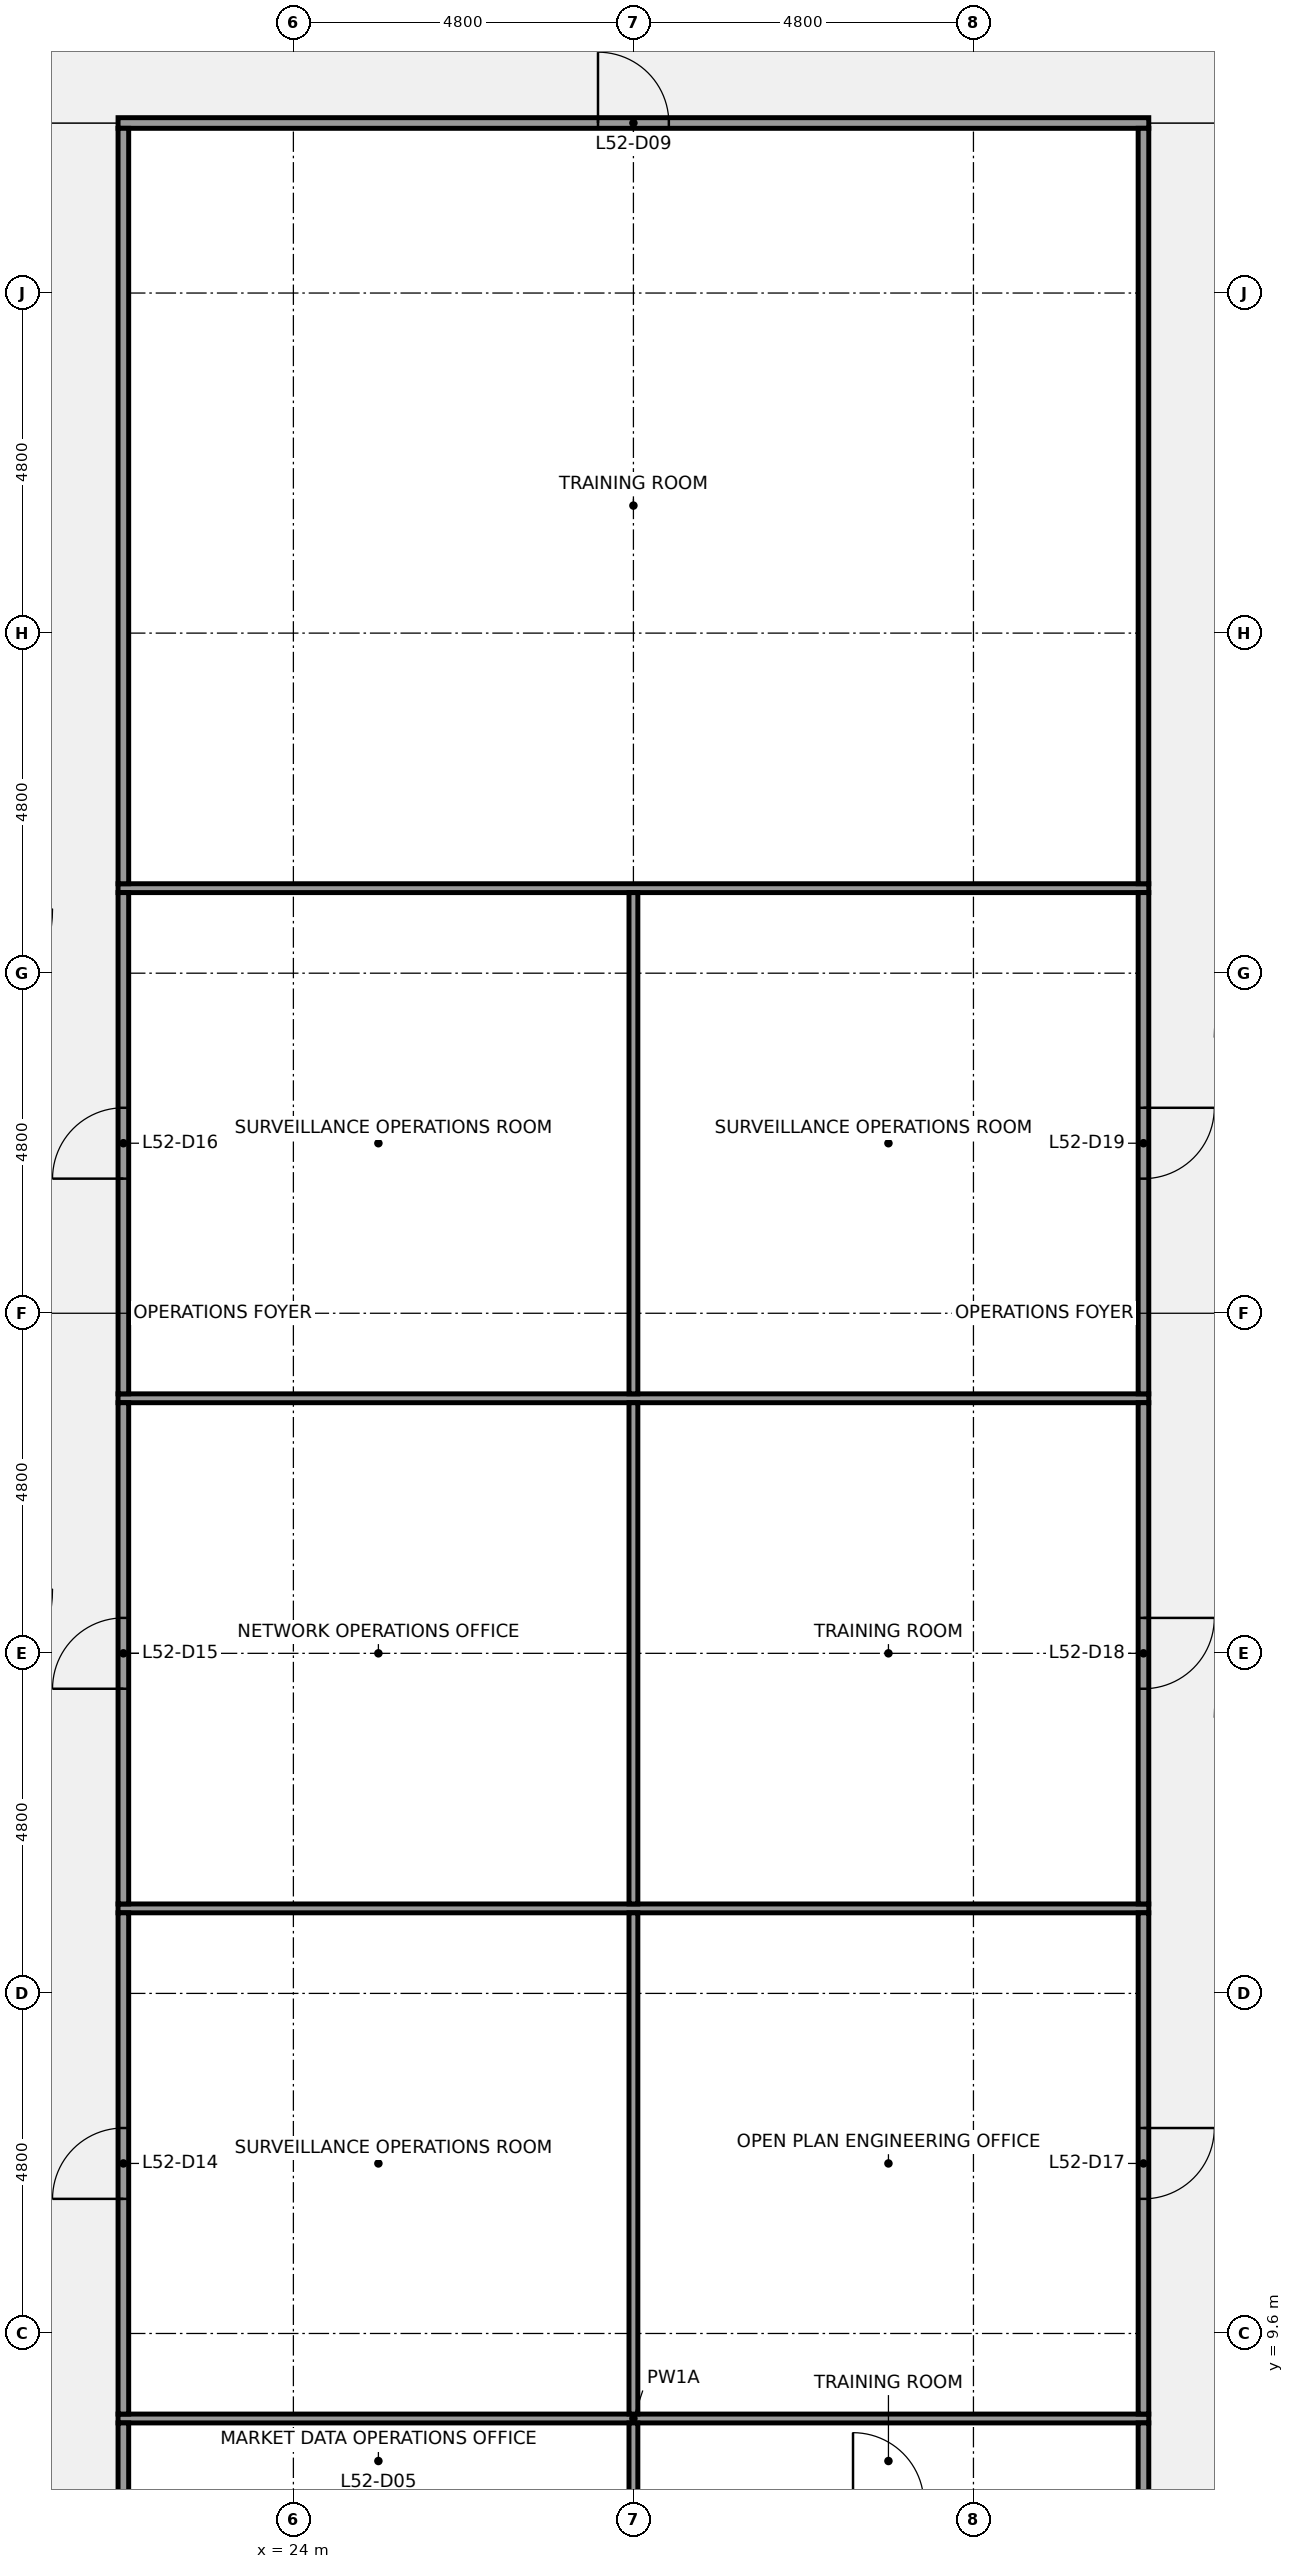
"""IFC4 building model, lengths in metres.
Left out: names, types, materials, properties, quantities, classifications, styles, units other than length and angle.
Written with IfcOpenShell. Run it as: python <this file> out.ifc"""

import sys

from ifc_helpers import new_model, si_unit, direction, frame, frame_2d, origin, place, context, subcontext, project, spatial, rectangle, extrude, element, fill, save


model = new_model("IFC4")
c1 = context("Model", 3, precision=1e-05, world=origin(), true_north=direction((0.0, 1.0)))
c2 = subcontext(c1, "Body", "Model", "MODEL_VIEW")
j1 = project(units=[si_unit("LENGTHUNIT", "METRE"), si_unit("PLANEANGLEUNIT", "RADIAN")], contexts=[c1])
p1 = place(None, origin())
s1 = spatial("IfcSite", under=j1, at=p1, CompositionType="ELEMENT")
p2 = place(p1, origin())
s2 = spatial("IfcBuilding", under=s1, at=p2, CompositionType="ELEMENT")
p3 = place(p2, frame((0.0, 0.0, 237.2)))
s3 = spatial("IfcBuildingStorey", under=s2, at=p3, CompositionType="ELEMENT", Elevation=237.2)
for number, where, z_axis, x_axis in (
    (1, (21.525, 8.4, 0.0), (0.0, 0.0, 1.0), (1.0, 0.0, 0.0)),
    (2, (21.525, 15.6, 0.0), (0.0, 0.0, 1.0), (1.0, 0.0, 0.0)),
    (3, (21.525, 22.8, 0.0), (0.0, 0.0, 1.0), (1.0, 0.0, 0.0)),
    (4, (21.525, 30.0, 0.0), (0.0, 0.0, 1.0), (1.0, 0.0, 0.0)),
):
    element("IfcWall", number, at=place(p3, frame(where, z_axis=z_axis, x_axis=x_axis)), inside=s3, PredefinedType="PARTITIONING", context=c2, shape_type="SweptSolid", body=[
        extrude(rectangle(XDim=14.55, YDim=0.125, at=frame_2d((7.275, 0.0))), origin(), (0.0, 0.0, 1.0), 2.87),
    ])
p4 = place(p3, frame((21.525, 40.8, 0.0), z_axis=(0.0, 0.0, 1.0), x_axis=(1.0, 0.0, 0.0)))
e5 = element("IfcWall", 5, at=p4, inside=s3, PredefinedType="PARTITIONING", context=c2, shape_type="SweptSolid", body=[
    extrude(rectangle(XDim=14.55, YDim=0.15, at=frame_2d((7.275, 0.0))), origin(), (0.0, 0.0, 1.0), 2.87),
])
p5 = place(p4, frame((6.775, 0.0, 0.0)))
e6 = element("IfcOpeningElement", 6, at=p5, cuts=e5, PredefinedType="OPENING", context=c2, shape_type="SweptSolid", body=[
    extrude(rectangle(XDim=1.0, YDim=2.1, at=frame_2d((0.5, 1.05))), frame((0.0, 0.085, 0.0), z_axis=(0.0, -1.0, 0.0), x_axis=(1.0, 0.0, 0.0)), (0.0, 0.0, 1.0), 0.17),
])
p6 = place(p3, frame((21.6, 7.275, 0.0), z_axis=(0.0, 0.0, 1.0), x_axis=(0.0, 1.0, 0.0)))
e7 = element("IfcWall", 7, at=p6, inside=s3, PredefinedType="PARTITIONING", context=c2, shape_type="SweptSolid", body=[
    extrude(rectangle(XDim=1.062, YDim=0.15, at=frame_2d((0.531, 0.0))), origin(), (0.0, 0.0, 1.0), 2.87),
])
p7 = place(p3, frame((21.6, 8.462, 0.0), z_axis=(0.0, 0.0, 1.0), x_axis=(0.0, 1.0, 0.0)))
e8 = element("IfcWall", 8, at=p7, inside=s3, PredefinedType="PARTITIONING", context=c2, shape_type="SweptSolid", body=[
    extrude(rectangle(XDim=7.075, YDim=0.15, at=frame_2d((3.538, 0.0))), origin(), (0.0, 0.0, 1.0), 2.87),
])
p8 = place(p7, frame((3.038, 0.0, 0.0)))
e9 = element("IfcOpeningElement", 9, at=p8, cuts=e8, PredefinedType="OPENING", context=c2, shape_type="SweptSolid", body=[
    extrude(rectangle(XDim=1.0, YDim=2.1, at=frame_2d((0.5, 1.05))), frame((0.0, 0.085, 0.0), z_axis=(0.0, -1.0, 0.0), x_axis=(1.0, 0.0, 0.0)), (0.0, 0.0, 1.0), 0.17),
])
p9 = place(p3, frame((21.6, 15.663, 0.0), z_axis=(0.0, 0.0, 1.0), x_axis=(0.0, 1.0, 0.0)))
e10 = element("IfcWall", 10, at=p9, inside=s3, PredefinedType="PARTITIONING", context=c2, shape_type="SweptSolid", body=[
    extrude(rectangle(XDim=7.075, YDim=0.15, at=frame_2d((3.538, 0.0))), origin(), (0.0, 0.0, 1.0), 2.87),
])
p10 = place(p9, frame((3.038, 0.0, 0.0)))
e11 = element("IfcOpeningElement", 11, at=p10, cuts=e10, PredefinedType="OPENING", context=c2, shape_type="SweptSolid", body=[
    extrude(rectangle(XDim=1.0, YDim=2.1, at=frame_2d((0.5, 1.05))), frame((0.0, 0.085, 0.0), z_axis=(0.0, -1.0, 0.0), x_axis=(1.0, 0.0, 0.0)), (0.0, 0.0, 1.0), 0.17),
])
p11 = place(p3, frame((21.6, 22.863, 0.0), z_axis=(0.0, 0.0, 1.0), x_axis=(0.0, 1.0, 0.0)))
e12 = element("IfcWall", 12, at=p11, inside=s3, PredefinedType="PARTITIONING", context=c2, shape_type="SweptSolid", body=[
    extrude(rectangle(XDim=7.075, YDim=0.15, at=frame_2d((3.538, 0.0))), origin(), (0.0, 0.0, 1.0), 2.87),
])
p12 = place(p11, frame((3.038, 0.0, 0.0)))
e13 = element("IfcOpeningElement", 13, at=p12, cuts=e12, PredefinedType="OPENING", context=c2, shape_type="SweptSolid", body=[
    extrude(rectangle(XDim=1.0, YDim=2.1, at=frame_2d((0.5, 1.05))), frame((0.0, 0.085, 0.0), z_axis=(0.0, -1.0, 0.0), x_axis=(1.0, 0.0, 0.0)), (0.0, 0.0, 1.0), 0.17),
])
p13 = place(p3, frame((21.6, 30.062, 0.0), z_axis=(0.0, 0.0, 1.0), x_axis=(0.0, 1.0, 0.0)))
e14 = element("IfcWall", 14, at=p13, inside=s3, PredefinedType="PARTITIONING", context=c2, shape_type="SweptSolid", body=[
    extrude(rectangle(XDim=10.663, YDim=0.15, at=frame_2d((5.331, 0.0))), origin(), (0.0, 0.0, 1.0), 2.87),
])
p14 = place(p3, frame((28.8, 7.275, 0.0), z_axis=(0.0, 0.0, 1.0), x_axis=(0.0, 1.0, 0.0)))
e15 = element("IfcWall", 15, at=p14, inside=s3, PredefinedType="PARTITIONING", context=c2, shape_type="SweptSolid", body=[
    extrude(rectangle(XDim=1.062, YDim=0.125, at=frame_2d((0.531, 0.0))), origin(), (0.0, 0.0, 1.0), 2.87),
])
p15 = place(p3, frame((28.8, 8.462, 0.0), z_axis=(0.0, 0.0, 1.0), x_axis=(0.0, 1.0, 0.0)))
e16 = element("IfcWall", 16, at=p15, inside=s3, PredefinedType="PARTITIONING", context=c2, shape_type="SweptSolid", body=[
    extrude(rectangle(XDim=7.075, YDim=0.125, at=frame_2d((3.538, 0.0))), origin(), (0.0, 0.0, 1.0), 2.87),
])
for number, where, z_axis, x_axis in (
    (17, (28.8, 15.663, 0.0), (0.0, 0.0, 1.0), (0.0, 1.0, 0.0)),
    (18, (28.8, 22.863, 0.0), (0.0, 0.0, 1.0), (0.0, 1.0, 0.0)),
):
    element("IfcWall", number, at=place(p3, frame(where, z_axis=z_axis, x_axis=x_axis)), inside=s3, PredefinedType="PARTITIONING", context=c2, shape_type="SweptSolid", body=[
        extrude(rectangle(XDim=7.075, YDim=0.125, at=frame_2d((3.538, 0.0))), origin(), (0.0, 0.0, 1.0), 2.87),
    ])
p16 = place(p3, frame((36.0, 7.275, 0.0), z_axis=(0.0, 0.0, 1.0), x_axis=(0.0, 1.0, 0.0)))
e19 = element("IfcWall", 19, at=p16, inside=s3, PredefinedType="PARTITIONING", context=c2, shape_type="SweptSolid", body=[
    extrude(rectangle(XDim=1.062, YDim=0.15, at=frame_2d((0.531, 0.0))), origin(), (0.0, 0.0, 1.0), 2.87),
])
p17 = place(p3, frame((36.0, 8.462, 0.0), z_axis=(0.0, 0.0, 1.0), x_axis=(0.0, 1.0, 0.0)))
e20 = element("IfcWall", 20, at=p17, inside=s3, PredefinedType="PARTITIONING", context=c2, shape_type="SweptSolid", body=[
    extrude(rectangle(XDim=7.075, YDim=0.15, at=frame_2d((3.538, 0.0))), origin(), (0.0, 0.0, 1.0), 2.87),
])
p18 = place(p17, frame((3.038, 0.0, 0.0)))
e21 = element("IfcOpeningElement", 21, at=p18, cuts=e20, PredefinedType="OPENING", context=c2, shape_type="SweptSolid", body=[
    extrude(rectangle(XDim=1.0, YDim=2.1, at=frame_2d((0.5, 1.05))), frame((0.0, 0.085, 0.0), z_axis=(0.0, -1.0, 0.0), x_axis=(1.0, 0.0, 0.0)), (0.0, 0.0, 1.0), 0.17),
])
p19 = place(p3, frame((36.0, 15.663, 0.0), z_axis=(0.0, 0.0, 1.0), x_axis=(0.0, 1.0, 0.0)))
e22 = element("IfcWall", 22, at=p19, inside=s3, PredefinedType="PARTITIONING", context=c2, shape_type="SweptSolid", body=[
    extrude(rectangle(XDim=7.075, YDim=0.15, at=frame_2d((3.538, 0.0))), origin(), (0.0, 0.0, 1.0), 2.87),
])
p20 = place(p19, frame((3.038, 0.0, 0.0)))
e23 = element("IfcOpeningElement", 23, at=p20, cuts=e22, PredefinedType="OPENING", context=c2, shape_type="SweptSolid", body=[
    extrude(rectangle(XDim=1.0, YDim=2.1, at=frame_2d((0.5, 1.05))), frame((0.0, 0.085, 0.0), z_axis=(0.0, -1.0, 0.0), x_axis=(1.0, 0.0, 0.0)), (0.0, 0.0, 1.0), 0.17),
])
p21 = place(p3, frame((36.0, 22.863, 0.0), z_axis=(0.0, 0.0, 1.0), x_axis=(0.0, 1.0, 0.0)))
e24 = element("IfcWall", 24, at=p21, inside=s3, PredefinedType="PARTITIONING", context=c2, shape_type="SweptSolid", body=[
    extrude(rectangle(XDim=7.075, YDim=0.15, at=frame_2d((3.538, 0.0))), origin(), (0.0, 0.0, 1.0), 2.87),
])
p22 = place(p21, frame((3.038, 0.0, 0.0)))
e25 = element("IfcOpeningElement", 25, at=p22, cuts=e24, PredefinedType="OPENING", context=c2, shape_type="SweptSolid", body=[
    extrude(rectangle(XDim=1.0, YDim=2.1, at=frame_2d((0.5, 1.05))), frame((0.0, 0.085, 0.0), z_axis=(0.0, -1.0, 0.0), x_axis=(1.0, 0.0, 0.0)), (0.0, 0.0, 1.0), 0.17),
])
p23 = place(p3, frame((36.0, 30.062, 0.0), z_axis=(0.0, 0.0, 1.0), x_axis=(0.0, 1.0, 0.0)))
e26 = element("IfcWall", 26, at=p23, inside=s3, PredefinedType="PARTITIONING", context=c2, shape_type="SweptSolid", body=[
    extrude(rectangle(XDim=10.663, YDim=0.15, at=frame_2d((5.331, 0.0))), origin(), (0.0, 0.0, 1.0), 2.87),
])
p24 = place(p5, origin())
e27 = element("IfcDoor", 27, at=p24, inside=s3, OperationType="SINGLE_SWING_LEFT", PredefinedType="DOOR", context=c2, shape_type="SweptSolid", body=[
    extrude(rectangle(XDim=1.0, YDim=2.1, at=frame_2d((0.5, 1.05))), frame((0.0, 0.025, 0.0), z_axis=(0.0, -1.0, 0.0), x_axis=(1.0, 0.0, 0.0)), (0.0, 0.0, 1.0), 0.05),
])
fill(e6, e27)
p25 = place(p8, origin())
e28 = element("IfcDoor", 28, at=p25, inside=s3, OperationType="SINGLE_SWING_LEFT", PredefinedType="DOOR", context=c2, shape_type="SweptSolid", body=[
    extrude(rectangle(XDim=1.0, YDim=2.1, at=frame_2d((0.5, 1.05))), frame((0.0, 0.025, 0.0), z_axis=(0.0, -1.0, 0.0), x_axis=(1.0, 0.0, 0.0)), (0.0, 0.0, 1.0), 0.05),
])
fill(e9, e28)
p26 = place(p10, origin())
e29 = element("IfcDoor", 29, at=p26, inside=s3, OperationType="SINGLE_SWING_LEFT", PredefinedType="DOOR", context=c2, shape_type="SweptSolid", body=[
    extrude(rectangle(XDim=1.0, YDim=2.1, at=frame_2d((0.5, 1.05))), frame((0.0, 0.025, 0.0), z_axis=(0.0, -1.0, 0.0), x_axis=(1.0, 0.0, 0.0)), (0.0, 0.0, 1.0), 0.05),
])
fill(e11, e29)
p27 = place(p12, origin())
e30 = element("IfcDoor", 30, at=p27, inside=s3, OperationType="SINGLE_SWING_LEFT", PredefinedType="DOOR", context=c2, shape_type="SweptSolid", body=[
    extrude(rectangle(XDim=1.0, YDim=2.1, at=frame_2d((0.5, 1.05))), frame((0.0, 0.025, 0.0), z_axis=(0.0, -1.0, 0.0), x_axis=(1.0, 0.0, 0.0)), (0.0, 0.0, 1.0), 0.05),
])
fill(e13, e30)
p28 = place(p18, origin())
e31 = element("IfcDoor", 31, at=p28, inside=s3, OperationType="SINGLE_SWING_RIGHT", PredefinedType="DOOR", context=c2, shape_type="SweptSolid", body=[
    extrude(rectangle(XDim=1.0, YDim=2.1, at=frame_2d((0.5, 1.05))), frame((0.0, 0.025, 0.0), z_axis=(0.0, -1.0, 0.0), x_axis=(1.0, 0.0, 0.0)), (0.0, 0.0, 1.0), 0.05),
])
fill(e21, e31)
p29 = place(p20, origin())
e32 = element("IfcDoor", 32, at=p29, inside=s3, OperationType="SINGLE_SWING_RIGHT", PredefinedType="DOOR", context=c2, shape_type="SweptSolid", body=[
    extrude(rectangle(XDim=1.0, YDim=2.1, at=frame_2d((0.5, 1.05))), frame((0.0, 0.025, 0.0), z_axis=(0.0, -1.0, 0.0), x_axis=(1.0, 0.0, 0.0)), (0.0, 0.0, 1.0), 0.05),
])
fill(e23, e32)
p30 = place(p22, origin())
e33 = element("IfcDoor", 33, at=p30, inside=s3, OperationType="SINGLE_SWING_RIGHT", PredefinedType="DOOR", context=c2, shape_type="SweptSolid", body=[
    extrude(rectangle(XDim=1.0, YDim=2.1, at=frame_2d((0.5, 1.05))), frame((0.0, 0.025, 0.0), z_axis=(0.0, -1.0, 0.0), x_axis=(1.0, 0.0, 0.0)), (0.0, 0.0, 1.0), 0.05),
])
fill(e25, e33)
save(model, sys.argv[1])
